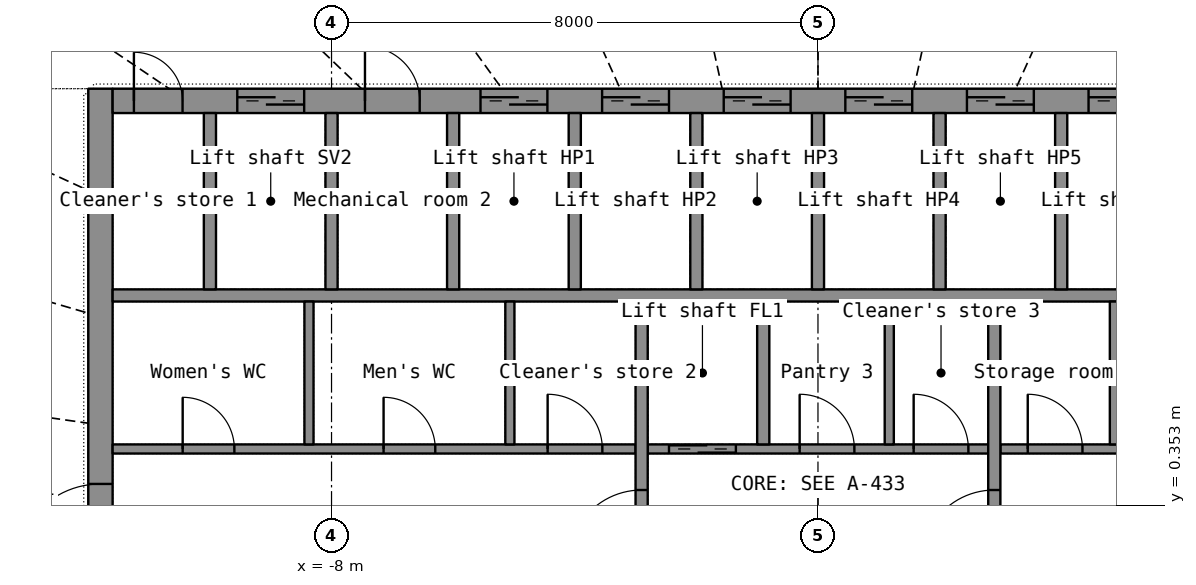
"""IFC4 building model, lengths in metres.
Left out: names, types, materials, properties, quantities, classifications, styles, units other than length and angle.
Written with IfcOpenShell. Run it as: python <this file> out.ifc"""

import sys

from ifc_helpers import new_model, si_unit, direction, frame, frame_2d, origin, place, context, subcontext, project, spatial, rectangle, extrude, element, fill, save


model = new_model("IFC4")
c1 = context("Model", 3, precision=1e-05, world=origin(), true_north=direction((0.0, 1.0)))
c2 = subcontext(c1, "Body", "Model", "MODEL_VIEW")
j1 = project(units=[si_unit("LENGTHUNIT", "METRE"), si_unit("PLANEANGLEUNIT", "RADIAN")], contexts=[c1])
p1 = place(None, origin())
s1 = spatial("IfcSite", under=j1, at=p1, CompositionType="ELEMENT")
p2 = place(p1, origin())
s2 = spatial("IfcBuilding", under=s1, at=p2, CompositionType="ELEMENT")
p3 = place(p2, frame((0.0, 0.0, 261.5)))
s3 = spatial("IfcBuildingStorey", under=s2, at=p3, CompositionType="ELEMENT", Elevation=261.5)
p4 = place(p3, frame((-11.8, -7.2, 0.0), z_axis=(0.0, 0.0, 1.0), x_axis=(0.0, 1.0, 0.0)))
e1 = element("IfcWall", 1, at=p4, inside=s3, PredefinedType="SHEAR", context=c2, shape_type="SweptSolid", body=[
    extrude(rectangle(XDim=14.4, YDim=0.4, at=frame_2d((7.2, 0.0))), origin(), (0.0, 0.0, 1.0), 3.3),
])
p5 = place(p4, frame((6.5, 0.0, 0.0)))
e2 = element("IfcOpeningElement", 2, at=p5, cuts=e1, PredefinedType="OPENING", context=c2, shape_type="SweptSolid", body=[
    extrude(rectangle(XDim=1.4, YDim=2.2, at=frame_2d((0.7, 1.1))), frame((0.0, 0.21, 0.0), z_axis=(0.0, -1.0, 0.0), x_axis=(1.0, 0.0, 0.0)), (0.0, 0.0, 1.0), 0.42),
])
p6 = place(p3, frame((-11.6, 7.0, 0.0), z_axis=(0.0, 0.0, 1.0), x_axis=(1.0, 0.0, 0.0)))
e3 = element("IfcWall", 3, at=p6, inside=s3, PredefinedType="SHEAR", context=c2, shape_type="SweptSolid", body=[
    extrude(rectangle(XDim=23.2, YDim=0.4, at=frame_2d((11.6, 0.0))), origin(), (0.0, 0.0, 1.0), 3.3),
])
p7 = place(p6, frame((2.05, 0.0, 0.0)))
e4 = element("IfcOpeningElement", 4, at=p7, cuts=e3, PredefinedType="OPENING", context=c2, shape_type="SweptSolid", body=[
    extrude(rectangle(XDim=1.1, YDim=2.2, at=frame_2d((0.55, 1.1))), frame((0.0, 0.21, 0.0), z_axis=(0.0, -1.0, 0.0), x_axis=(1.0, 0.0, 0.0)), (0.0, 0.0, 1.0), 0.42),
])
p8 = place(p6, frame((6.05, 0.0, 0.0)))
e5 = element("IfcOpeningElement", 5, at=p8, cuts=e3, PredefinedType="OPENING", context=c2, shape_type="SweptSolid", body=[
    extrude(rectangle(XDim=1.1, YDim=2.2, at=frame_2d((0.55, 1.1))), frame((0.0, 0.21, 0.0), z_axis=(0.0, -1.0, 0.0), x_axis=(1.0, 0.0, 0.0)), (0.0, 0.0, 1.0), 0.42),
])
p9 = place(p6, frame((8.05, 0.0, 0.0)))
e6 = element("IfcOpeningElement", 6, at=p9, cuts=e3, PredefinedType="OPENING", context=c2, shape_type="SweptSolid", body=[
    extrude(rectangle(XDim=1.1, YDim=2.2, at=frame_2d((0.55, 1.1))), frame((0.0, 0.21, 0.0), z_axis=(0.0, -1.0, 0.0), x_axis=(1.0, 0.0, 0.0)), (0.0, 0.0, 1.0), 0.42),
])
p10 = place(p6, frame((10.05, 0.0, 0.0)))
e7 = element("IfcOpeningElement", 7, at=p10, cuts=e3, PredefinedType="OPENING", context=c2, shape_type="SweptSolid", body=[
    extrude(rectangle(XDim=1.1, YDim=2.2, at=frame_2d((0.55, 1.1))), frame((0.0, 0.21, 0.0), z_axis=(0.0, -1.0, 0.0), x_axis=(1.0, 0.0, 0.0)), (0.0, 0.0, 1.0), 0.42),
])
p11 = place(p6, frame((12.05, 0.0, 0.0)))
e8 = element("IfcOpeningElement", 8, at=p11, cuts=e3, PredefinedType="OPENING", context=c2, shape_type="SweptSolid", body=[
    extrude(rectangle(XDim=1.1, YDim=2.2, at=frame_2d((0.55, 1.1))), frame((0.0, 0.21, 0.0), z_axis=(0.0, -1.0, 0.0), x_axis=(1.0, 0.0, 0.0)), (0.0, 0.0, 1.0), 0.42),
])
p12 = place(p6, frame((14.05, 0.0, 0.0)))
e9 = element("IfcOpeningElement", 9, at=p12, cuts=e3, PredefinedType="OPENING", context=c2, shape_type="SweptSolid", body=[
    extrude(rectangle(XDim=1.1, YDim=2.2, at=frame_2d((0.55, 1.1))), frame((0.0, 0.21, 0.0), z_axis=(0.0, -1.0, 0.0), x_axis=(1.0, 0.0, 0.0)), (0.0, 0.0, 1.0), 0.42),
])
p13 = place(p6, frame((16.05, 0.0, 0.0)))
e10 = element("IfcOpeningElement", 10, at=p13, cuts=e3, PredefinedType="OPENING", context=c2, shape_type="SweptSolid", body=[
    extrude(rectangle(XDim=1.1, YDim=2.2, at=frame_2d((0.55, 1.1))), frame((0.0, 0.21, 0.0), z_axis=(0.0, -1.0, 0.0), x_axis=(1.0, 0.0, 0.0)), (0.0, 0.0, 1.0), 0.42),
])
p14 = place(p6, frame((18.05, 0.0, 0.0)))
e11 = element("IfcOpeningElement", 11, at=p14, cuts=e3, PredefinedType="OPENING", context=c2, shape_type="SweptSolid", body=[
    extrude(rectangle(XDim=1.1, YDim=2.2, at=frame_2d((0.55, 1.1))), frame((0.0, 0.21, 0.0), z_axis=(0.0, -1.0, 0.0), x_axis=(1.0, 0.0, 0.0)), (0.0, 0.0, 1.0), 0.42),
])
p15 = place(p6, frame((20.05, 0.0, 0.0)))
e12 = element("IfcOpeningElement", 12, at=p15, cuts=e3, PredefinedType="OPENING", context=c2, shape_type="SweptSolid", body=[
    extrude(rectangle(XDim=1.1, YDim=2.2, at=frame_2d((0.55, 1.1))), frame((0.0, 0.21, 0.0), z_axis=(0.0, -1.0, 0.0), x_axis=(1.0, 0.0, 0.0)), (0.0, 0.0, 1.0), 0.42),
])
p16 = place(p6, frame((4.15, 0.0, 0.0)))
e13 = element("IfcOpeningElement", 13, at=p16, cuts=e3, PredefinedType="OPENING", context=c2, shape_type="SweptSolid", body=[
    extrude(rectangle(XDim=0.9, YDim=2.1, at=frame_2d((0.45, 1.05))), frame((0.0, 0.21, 0.0), z_axis=(0.0, -1.0, 0.0), x_axis=(1.0, 0.0, 0.0)), (0.0, 0.0, 1.0), 0.42),
])
p17 = place(p6, frame((0.35, 0.0, 0.0)))
e14 = element("IfcOpeningElement", 14, at=p17, cuts=e3, PredefinedType="OPENING", context=c2, shape_type="SweptSolid", body=[
    extrude(rectangle(XDim=0.8, YDim=2.05, at=frame_2d((0.4, 1.025))), frame((0.0, 0.21, 0.0), z_axis=(0.0, -1.0, 0.0), x_axis=(1.0, 0.0, 0.0)), (0.0, 0.0, 1.0), 0.42),
])
p18 = place(p6, frame((22.05, 0.0, 0.0)))
e15 = element("IfcOpeningElement", 15, at=p18, cuts=e3, PredefinedType="OPENING", context=c2, shape_type="SweptSolid", body=[
    extrude(rectangle(XDim=0.8, YDim=2.05, at=frame_2d((0.4, 1.025))), frame((0.0, 0.21, 0.0), z_axis=(0.0, -1.0, 0.0), x_axis=(1.0, 0.0, 0.0)), (0.0, 0.0, 1.0), 0.42),
])
p19 = place(p3, frame((-11.6, 3.8, 0.0), z_axis=(0.0, 0.0, 1.0), x_axis=(1.0, 0.0, 0.0)))
e16 = element("IfcWall", 16, at=p19, inside=s3, PredefinedType="SHEAR", context=c2, shape_type="SweptSolid", body=[
    extrude(rectangle(XDim=23.2, YDim=0.2, at=frame_2d((11.6, 0.0))), origin(), (0.0, 0.0, 1.0), 3.3),
])
for number, where, z_axis, x_axis in (
    (17, (-10.0, 3.9, 0.0), (0.0, 0.0, 1.0), (0.0, 1.0, 0.0)),
    (18, (-8.0, 3.9, 0.0), (0.0, 0.0, 1.0), (0.0, 1.0, 0.0)),
    (19, (-6.0, 3.9, 0.0), (0.0, 0.0, 1.0), (0.0, 1.0, 0.0)),
    (20, (-4.0, 3.9, 0.0), (0.0, 0.0, 1.0), (0.0, 1.0, 0.0)),
    (21, (-2.0, 3.9, 0.0), (0.0, 0.0, 1.0), (0.0, 1.0, 0.0)),
    (22, (0.0, 3.9, 0.0), (0.0, 0.0, 1.0), (0.0, 1.0, 0.0)),
    (23, (2.0, 3.9, 0.0), (0.0, 0.0, 1.0), (0.0, 1.0, 0.0)),
    (24, (4.0, 3.9, 0.0), (0.0, 0.0, 1.0), (0.0, 1.0, 0.0)),
):
    element("IfcWall", number, at=place(p3, frame(where, z_axis=z_axis, x_axis=x_axis)), inside=s3, PredefinedType="SHEAR", context=c2, shape_type="SweptSolid", body=[
        extrude(rectangle(XDim=2.9, YDim=0.2, at=frame_2d((1.45, 0.0))), origin(), (0.0, 0.0, 1.0), 3.3),
    ])
p20 = place(p3, frame((-11.6, 1.275, 0.0), z_axis=(0.0, 0.0, 1.0), x_axis=(1.0, 0.0, 0.0)))
e25 = element("IfcWall", 25, at=p20, inside=s3, PredefinedType="PARTITIONING", context=c2, shape_type="SweptSolid", body=[
    extrude(rectangle(XDim=8.6, YDim=0.15, at=frame_2d((4.3, 0.0))), origin(), (0.0, 0.0, 1.0), 3.3),
])
p21 = place(p20, frame((1.152, 0.0, 0.0)))
e26 = element("IfcOpeningElement", 26, at=p21, cuts=e25, PredefinedType="OPENING", context=c2, shape_type="SweptSolid", body=[
    extrude(rectangle(XDim=0.85, YDim=2.1, at=frame_2d((0.425, 1.05))), frame((0.0, 0.085, 0.0), z_axis=(0.0, -1.0, 0.0), x_axis=(1.0, 0.0, 0.0)), (0.0, 0.0, 1.0), 0.17),
])
p22 = place(p20, frame((4.456, 0.0, 0.0)))
e27 = element("IfcOpeningElement", 27, at=p22, cuts=e25, PredefinedType="OPENING", context=c2, shape_type="SweptSolid", body=[
    extrude(rectangle(XDim=0.85, YDim=2.1, at=frame_2d((0.425, 1.05))), frame((0.0, 0.085, 0.0), z_axis=(0.0, -1.0, 0.0), x_axis=(1.0, 0.0, 0.0)), (0.0, 0.0, 1.0), 0.17),
])
p23 = place(p20, frame((7.154, 0.0, 0.0)))
e28 = element("IfcOpeningElement", 28, at=p23, cuts=e25, PredefinedType="OPENING", context=c2, shape_type="SweptSolid", body=[
    extrude(rectangle(XDim=0.9, YDim=2.1, at=frame_2d((0.45, 1.05))), frame((0.0, 0.085, 0.0), z_axis=(0.0, -1.0, 0.0), x_axis=(1.0, 0.0, 0.0)), (0.0, 0.0, 1.0), 0.17),
])
p24 = place(p3, frame((-2.8, 1.275, 0.0), z_axis=(0.0, 0.0, 1.0), x_axis=(1.0, 0.0, 0.0)))
e29 = element("IfcWall", 29, at=p24, inside=s3, PredefinedType="SHEAR", context=c2, shape_type="SweptSolid", body=[
    extrude(rectangle(XDim=5.6, YDim=0.15, at=frame_2d((2.8, 0.0))), origin(), (0.0, 0.0, 1.0), 3.3),
])
p25 = place(p24, frame((0.35, 0.0, 0.0)))
e30 = element("IfcOpeningElement", 30, at=p25, cuts=e29, PredefinedType="OPENING", context=c2, shape_type="SweptSolid", body=[
    extrude(rectangle(XDim=1.1, YDim=2.2, at=frame_2d((0.55, 1.1))), frame((0.0, 0.085, 0.0), z_axis=(0.0, -1.0, 0.0), x_axis=(1.0, 0.0, 0.0)), (0.0, 0.0, 1.0), 0.17),
])
p26 = place(p24, frame((2.499, 0.0, 0.0)))
e31 = element("IfcOpeningElement", 31, at=p26, cuts=e29, PredefinedType="OPENING", context=c2, shape_type="SweptSolid", body=[
    extrude(rectangle(XDim=0.9, YDim=2.1, at=frame_2d((0.45, 1.05))), frame((0.0, 0.085, 0.0), z_axis=(0.0, -1.0, 0.0), x_axis=(1.0, 0.0, 0.0)), (0.0, 0.0, 1.0), 0.17),
])
p27 = place(p24, frame((4.374, 0.0, 0.0)))
e32 = element("IfcOpeningElement", 32, at=p27, cuts=e29, PredefinedType="OPENING", context=c2, shape_type="SweptSolid", body=[
    extrude(rectangle(XDim=0.9, YDim=2.1, at=frame_2d((0.45, 1.05))), frame((0.0, 0.085, 0.0), z_axis=(0.0, -1.0, 0.0), x_axis=(1.0, 0.0, 0.0)), (0.0, 0.0, 1.0), 0.17),
])
p28 = place(p3, frame((3.0, 1.275, 0.0), z_axis=(0.0, 0.0, 1.0), x_axis=(1.0, 0.0, 0.0)))
e33 = element("IfcWall", 33, at=p28, inside=s3, PredefinedType="SHEAR", context=c2, shape_type="SweptSolid", body=[
    extrude(rectangle(XDim=8.6, YDim=0.15, at=frame_2d((4.3, 0.0))), origin(), (0.0, 0.0, 1.0), 3.3),
])
p29 = place(p28, frame((2.05, 0.0, 0.0)))
e34 = element("IfcOpeningElement", 34, at=p29, cuts=e33, PredefinedType="OPENING", context=c2, shape_type="SweptSolid", body=[
    extrude(rectangle(XDim=1.1, YDim=2.15, at=frame_2d((0.55, 1.075))), frame((0.0, 0.085, 0.0), z_axis=(0.0, -1.0, 0.0), x_axis=(1.0, 0.0, 0.0)), (0.0, 0.0, 1.0), 0.17),
])
p30 = place(p28, frame((0.45, 0.0, 0.0)))
e35 = element("IfcOpeningElement", 35, at=p30, cuts=e33, PredefinedType="OPENING", context=c2, shape_type="SweptSolid", body=[
    extrude(rectangle(XDim=0.9, YDim=2.1, at=frame_2d((0.45, 1.05))), frame((0.0, 0.085, 0.0), z_axis=(0.0, -1.0, 0.0), x_axis=(1.0, 0.0, 0.0)), (0.0, 0.0, 1.0), 0.17),
])
p31 = place(p3, frame((-2.9, -3.7, 0.0), z_axis=(0.0, 0.0, 1.0), x_axis=(0.0, 1.0, 0.0)))
e36 = element("IfcWall", 36, at=p31, inside=s3, PredefinedType="SHEAR", context=c2, shape_type="SweptSolid", body=[
    extrude(rectangle(XDim=7.4, YDim=0.2, at=frame_2d((3.7, 0.0))), origin(), (0.0, 0.0, 1.0), 3.3),
])
p32 = place(p31, frame((3.1, 0.0, 0.0)))
e37 = element("IfcOpeningElement", 37, at=p32, cuts=e36, PredefinedType="OPENING", context=c2, shape_type="SweptSolid", body=[
    extrude(rectangle(XDim=1.2, YDim=2.2, at=frame_2d((0.6, 1.1))), frame((0.0, 0.11, 0.0), z_axis=(0.0, -1.0, 0.0), x_axis=(1.0, 0.0, 0.0)), (0.0, 0.0, 1.0), 0.22),
])
p33 = place(p3, frame((2.9, -3.7, 0.0), z_axis=(0.0, 0.0, 1.0), x_axis=(0.0, 1.0, 0.0)))
e38 = element("IfcWall", 38, at=p33, inside=s3, PredefinedType="SHEAR", context=c2, shape_type="SweptSolid", body=[
    extrude(rectangle(XDim=7.4, YDim=0.2, at=frame_2d((3.7, 0.0))), origin(), (0.0, 0.0, 1.0), 3.3),
])
p34 = place(p33, frame((3.1, 0.0, 0.0)))
e39 = element("IfcOpeningElement", 39, at=p34, cuts=e38, PredefinedType="OPENING", context=c2, shape_type="SweptSolid", body=[
    extrude(rectangle(XDim=1.2, YDim=2.2, at=frame_2d((0.6, 1.1))), frame((0.0, 0.11, 0.0), z_axis=(0.0, -1.0, 0.0), x_axis=(1.0, 0.0, 0.0)), (0.0, 0.0, 1.0), 0.22),
])
for number, where, z_axis, x_axis in (
    (40, (-0.9, 1.35, 0.0), (0.0, 0.0, 1.0), (0.0, 1.0, 0.0)),
    (41, (4.9, 1.35, 0.0), (0.0, 0.0, 1.0), (0.0, 1.0, 0.0)),
):
    element("IfcWall", number, at=place(p3, frame(where, z_axis=z_axis, x_axis=x_axis)), inside=s3, PredefinedType="SHEAR", context=c2, shape_type="SweptSolid", body=[
        extrude(rectangle(XDim=2.35, YDim=0.2, at=frame_2d((1.175, 0.0))), origin(), (0.0, 0.0, 1.0), 3.3),
    ])
for number, where, z_axis, x_axis in (
    (42, (-8.371, 1.35, 0.0), (0.0, 0.0, 1.0), (0.0, 1.0, 0.0)),
    (43, (-5.067, 1.35, 0.0), (0.0, 0.0, 1.0), (0.0, 1.0, 0.0)),
    (44, (1.173, 1.35, 0.0), (0.0, 0.0, 1.0), (0.0, 1.0, 0.0)),
):
    element("IfcWall", number, at=place(p3, frame(where, z_axis=z_axis, x_axis=x_axis)), inside=s3, PredefinedType="PARTITIONING", context=c2, shape_type="SweptSolid", body=[
        extrude(rectangle(XDim=2.35, YDim=0.15, at=frame_2d((1.175, 0.0))), origin(), (0.0, 0.0, 1.0), 3.3),
    ])
p35 = place(p7, origin())
e45 = element("IfcDoor", 45, at=p35, inside=s3, OperationType="DOUBLE_DOOR_SLIDING", PredefinedType="DOOR", context=c2, shape_type="SweptSolid", body=[
    extrude(rectangle(XDim=1.1, YDim=2.2, at=frame_2d((0.55, 1.1))), frame((0.0, 0.025, 0.0), z_axis=(0.0, -1.0, 0.0), x_axis=(1.0, 0.0, 0.0)), (0.0, 0.0, 1.0), 0.05),
])
fill(e4, e45)
p36 = place(p8, origin())
e46 = element("IfcDoor", 46, at=p36, inside=s3, OperationType="DOUBLE_DOOR_SLIDING", PredefinedType="DOOR", context=c2, shape_type="SweptSolid", body=[
    extrude(rectangle(XDim=1.1, YDim=2.2, at=frame_2d((0.55, 1.1))), frame((0.0, 0.025, 0.0), z_axis=(0.0, -1.0, 0.0), x_axis=(1.0, 0.0, 0.0)), (0.0, 0.0, 1.0), 0.05),
])
fill(e5, e46)
p37 = place(p9, origin())
e47 = element("IfcDoor", 47, at=p37, inside=s3, OperationType="DOUBLE_DOOR_SLIDING", PredefinedType="DOOR", context=c2, shape_type="SweptSolid", body=[
    extrude(rectangle(XDim=1.1, YDim=2.2, at=frame_2d((0.55, 1.1))), frame((0.0, 0.025, 0.0), z_axis=(0.0, -1.0, 0.0), x_axis=(1.0, 0.0, 0.0)), (0.0, 0.0, 1.0), 0.05),
])
fill(e6, e47)
p38 = place(p10, origin())
e48 = element("IfcDoor", 48, at=p38, inside=s3, OperationType="DOUBLE_DOOR_SLIDING", PredefinedType="DOOR", context=c2, shape_type="SweptSolid", body=[
    extrude(rectangle(XDim=1.1, YDim=2.2, at=frame_2d((0.55, 1.1))), frame((0.0, 0.025, 0.0), z_axis=(0.0, -1.0, 0.0), x_axis=(1.0, 0.0, 0.0)), (0.0, 0.0, 1.0), 0.05),
])
fill(e7, e48)
p39 = place(p11, origin())
e49 = element("IfcDoor", 49, at=p39, inside=s3, OperationType="DOUBLE_DOOR_SLIDING", PredefinedType="DOOR", context=c2, shape_type="SweptSolid", body=[
    extrude(rectangle(XDim=1.1, YDim=2.2, at=frame_2d((0.55, 1.1))), frame((0.0, 0.025, 0.0), z_axis=(0.0, -1.0, 0.0), x_axis=(1.0, 0.0, 0.0)), (0.0, 0.0, 1.0), 0.05),
])
fill(e8, e49)
p40 = place(p12, origin())
e50 = element("IfcDoor", 50, at=p40, inside=s3, OperationType="DOUBLE_DOOR_SLIDING", PredefinedType="DOOR", context=c2, shape_type="SweptSolid", body=[
    extrude(rectangle(XDim=1.1, YDim=2.2, at=frame_2d((0.55, 1.1))), frame((0.0, 0.025, 0.0), z_axis=(0.0, -1.0, 0.0), x_axis=(1.0, 0.0, 0.0)), (0.0, 0.0, 1.0), 0.05),
])
fill(e9, e50)
p41 = place(p13, origin())
e51 = element("IfcDoor", 51, at=p41, inside=s3, OperationType="DOUBLE_DOOR_SLIDING", PredefinedType="DOOR", context=c2, shape_type="SweptSolid", body=[
    extrude(rectangle(XDim=1.1, YDim=2.2, at=frame_2d((0.55, 1.1))), frame((0.0, 0.025, 0.0), z_axis=(0.0, -1.0, 0.0), x_axis=(1.0, 0.0, 0.0)), (0.0, 0.0, 1.0), 0.05),
])
fill(e10, e51)
p42 = place(p16, origin())
e52 = element("IfcDoor", 52, at=p42, inside=s3, OperationType="SINGLE_SWING_LEFT", PredefinedType="DOOR", context=c2, shape_type="SweptSolid", body=[
    extrude(rectangle(XDim=0.9, YDim=2.1, at=frame_2d((0.45, 1.05))), frame((0.0, 0.025, 0.0), z_axis=(0.0, -1.0, 0.0), x_axis=(1.0, 0.0, 0.0)), (0.0, 0.0, 1.0), 0.05),
])
fill(e13, e52)
p43 = place(p17, origin())
e53 = element("IfcDoor", 53, at=p43, inside=s3, OperationType="SINGLE_SWING_LEFT", PredefinedType="DOOR", context=c2, shape_type="SweptSolid", body=[
    extrude(rectangle(XDim=0.8, YDim=2.05, at=frame_2d((0.4, 1.025))), frame((0.0, 0.025, 0.0), z_axis=(0.0, -1.0, 0.0), x_axis=(1.0, 0.0, 0.0)), (0.0, 0.0, 1.0), 0.05),
])
fill(e14, e53)
p44 = place(p5, origin())
e54 = element("IfcDoor", 54, at=p44, inside=s3, OperationType="DOUBLE_DOOR_SINGLE_SWING", PredefinedType="DOOR", context=c2, shape_type="SweptSolid", body=[
    extrude(rectangle(XDim=1.4, YDim=2.2, at=frame_2d((0.7, 1.1))), frame((0.0, 0.025, 0.0), z_axis=(0.0, -1.0, 0.0), x_axis=(1.0, 0.0, 0.0)), (0.0, 0.0, 1.0), 0.05),
])
fill(e2, e54)
p45 = place(p32, origin())
e55 = element("IfcDoor", 55, at=p45, inside=s3, OperationType="SINGLE_SWING_LEFT", PredefinedType="DOOR", context=c2, shape_type="SweptSolid", body=[
    extrude(rectangle(XDim=1.2, YDim=2.2, at=frame_2d((0.6, 1.1))), frame((0.0, 0.025, 0.0), z_axis=(0.0, -1.0, 0.0), x_axis=(1.0, 0.0, 0.0)), (0.0, 0.0, 1.0), 0.05),
])
fill(e37, e55)
p46 = place(p34, origin())
e56 = element("IfcDoor", 56, at=p46, inside=s3, OperationType="SINGLE_SWING_LEFT", PredefinedType="DOOR", context=c2, shape_type="SweptSolid", body=[
    extrude(rectangle(XDim=1.2, YDim=2.2, at=frame_2d((0.6, 1.1))), frame((0.0, 0.025, 0.0), z_axis=(0.0, -1.0, 0.0), x_axis=(1.0, 0.0, 0.0)), (0.0, 0.0, 1.0), 0.05),
])
fill(e39, e56)
p47 = place(p25, origin())
e57 = element("IfcDoor", 57, at=p47, inside=s3, OperationType="DOUBLE_DOOR_SLIDING", PredefinedType="DOOR", context=c2, shape_type="SweptSolid", body=[
    extrude(rectangle(XDim=1.1, YDim=2.2, at=frame_2d((0.55, 1.1))), frame((0.0, 0.025, 0.0), z_axis=(0.0, -1.0, 0.0), x_axis=(1.0, 0.0, 0.0)), (0.0, 0.0, 1.0), 0.05),
])
fill(e30, e57)
p48 = place(p21, origin())
e58 = element("IfcDoor", 58, at=p48, inside=s3, OperationType="SINGLE_SWING_LEFT", PredefinedType="DOOR", context=c2, shape_type="SweptSolid", body=[
    extrude(rectangle(XDim=0.85, YDim=2.1, at=frame_2d((0.425, 1.05))), frame((0.0, 0.025, 0.0), z_axis=(0.0, -1.0, 0.0), x_axis=(1.0, 0.0, 0.0)), (0.0, 0.0, 1.0), 0.05),
])
fill(e26, e58)
p49 = place(p22, origin())
e59 = element("IfcDoor", 59, at=p49, inside=s3, OperationType="SINGLE_SWING_LEFT", PredefinedType="DOOR", context=c2, shape_type="SweptSolid", body=[
    extrude(rectangle(XDim=0.85, YDim=2.1, at=frame_2d((0.425, 1.05))), frame((0.0, 0.025, 0.0), z_axis=(0.0, -1.0, 0.0), x_axis=(1.0, 0.0, 0.0)), (0.0, 0.0, 1.0), 0.05),
])
fill(e27, e59)
p50 = place(p23, origin())
e60 = element("IfcDoor", 60, at=p50, inside=s3, OperationType="SINGLE_SWING_LEFT", PredefinedType="DOOR", context=c2, shape_type="SweptSolid", body=[
    extrude(rectangle(XDim=0.9, YDim=2.1, at=frame_2d((0.45, 1.05))), frame((0.0, 0.025, 0.0), z_axis=(0.0, -1.0, 0.0), x_axis=(1.0, 0.0, 0.0)), (0.0, 0.0, 1.0), 0.05),
])
fill(e28, e60)
p51 = place(p26, origin())
e61 = element("IfcDoor", 61, at=p51, inside=s3, OperationType="SINGLE_SWING_LEFT", PredefinedType="DOOR", context=c2, shape_type="SweptSolid", body=[
    extrude(rectangle(XDim=0.9, YDim=2.1, at=frame_2d((0.45, 1.05))), frame((0.0, 0.025, 0.0), z_axis=(0.0, -1.0, 0.0), x_axis=(1.0, 0.0, 0.0)), (0.0, 0.0, 1.0), 0.05),
])
fill(e31, e61)
p52 = place(p27, origin())
e62 = element("IfcDoor", 62, at=p52, inside=s3, OperationType="SINGLE_SWING_LEFT", PredefinedType="DOOR", context=c2, shape_type="SweptSolid", body=[
    extrude(rectangle(XDim=0.9, YDim=2.1, at=frame_2d((0.45, 1.05))), frame((0.0, 0.025, 0.0), z_axis=(0.0, -1.0, 0.0), x_axis=(1.0, 0.0, 0.0)), (0.0, 0.0, 1.0), 0.05),
])
fill(e32, e62)
p53 = place(p30, origin())
e63 = element("IfcDoor", 63, at=p53, inside=s3, OperationType="SINGLE_SWING_LEFT", PredefinedType="DOOR", context=c2, shape_type="SweptSolid", body=[
    extrude(rectangle(XDim=0.9, YDim=2.1, at=frame_2d((0.45, 1.05))), frame((0.0, 0.025, 0.0), z_axis=(0.0, -1.0, 0.0), x_axis=(1.0, 0.0, 0.0)), (0.0, 0.0, 1.0), 0.05),
])
fill(e35, e63)
save(model, sys.argv[1])
